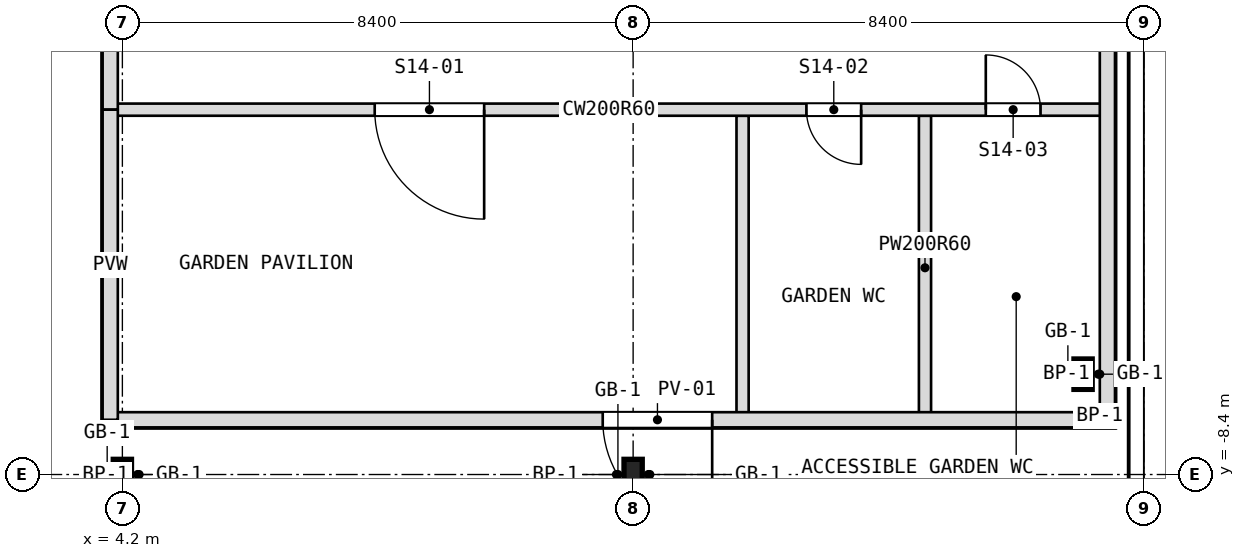
"""IFC4 building model, lengths in metres.
Left out: names, types, materials, properties, quantities, classifications, styles, units other than length and angle.
Written with IfcOpenShell. Run it as: python <this file> out.ifc"""

import sys

from ifc_helpers import new_model, si_unit, direction, frame, frame_2d, origin, origin_2d, place, context, subcontext, project, spatial, rectangle, i_section, extrude, element, fill, save


model = new_model("IFC4")
c1 = context("Model", 3, precision=1e-05, world=origin(), true_north=direction((0.0, 1.0)))
c2 = subcontext(c1, "Body", "Model", "MODEL_VIEW")
j1 = project(units=[si_unit("LENGTHUNIT", "METRE"), si_unit("PLANEANGLEUNIT", "RADIAN")], contexts=[c1])
p1 = place(None, origin())
s1 = spatial("IfcSite", under=j1, at=p1, CompositionType="ELEMENT")
p2 = place(p1, origin())
s2 = spatial("IfcBuilding", under=s1, at=p2, CompositionType="ELEMENT")
p3 = place(p2, frame((0.0, 0.0, 295.7)))
s3 = spatial("IfcBuildingStorey", under=s2, at=p3, CompositionType="ELEMENT", Elevation=295.7)
for number, where, z_axis, x_axis in (
    (1, (20.0, -6.75, -0.3), (0.0, 0.0, 1.0), (1.0, 0.0, 0.0)),
    (2, (4.2, -8.4, -0.3), (0.0, 0.0, 1.0), (1.0, 0.0, 0.0)),
    (3, (12.6, -8.4, -0.3), (0.0, 0.0, 1.0), (1.0, 0.0, 0.0)),
):
    element("IfcColumn", number, at=place(p3, frame(where, z_axis=z_axis, x_axis=x_axis)), inside=s3, PredefinedType="COLUMN", context=c2, shape_type="SweptSolid", body=[
        extrude(i_section(OverallWidth=0.3, OverallDepth=0.5, WebThickness=0.014, FlangeThickness=0.028, FilletRadius=0.027, at=origin_2d()), origin(), (0.0, 0.0, 1.0), 8.15),
    ])
for number, where, z_axis, x_axis in (
    (4, (17.4, -7.5, 0.0), (0.0, 0.0, 1.0), (0.0, 1.0, 0.0)),
    (5, (14.4, -7.5, 0.0), (0.0, 0.0, 1.0), (0.0, 1.0, 0.0)),
):
    element("IfcWall", number, at=place(p3, frame(where, z_axis=z_axis, x_axis=x_axis)), inside=s3, PredefinedType="PARTITIONING", context=c2, shape_type="SweptSolid", body=[
        extrude(rectangle(XDim=5.0, YDim=0.2, at=frame_2d((2.5, 0.0))), origin(), (0.0, 0.0, 1.0), 7.82),
    ])
p4 = place(p3, frame((4.0, -2.4, 0.0), z_axis=(0.0, 0.0, 1.0), x_axis=(1.0, 0.0, 0.0)))
e6 = element("IfcWall", 6, at=p4, inside=s3, PredefinedType="PARTITIONING", context=c2, shape_type="SweptSolid", body=[
    extrude(rectangle(XDim=16.4, YDim=0.2, at=frame_2d((8.2, 0.0))), origin(), (0.0, 0.0, 1.0), 7.82),
])
p5 = place(p4, frame((4.35, 0.0, 0.0)))
e7 = element("IfcOpeningElement", 7, at=p5, cuts=e6, PredefinedType="OPENING", context=c2, shape_type="SweptSolid", body=[
    extrude(rectangle(XDim=1.8, YDim=2.1, at=frame_2d((0.9, 1.05))), frame((0.0, 0.1, 0.0), z_axis=(0.0, -1.0, 0.0), x_axis=(1.0, 0.0, 0.0)), (0.0, 0.0, 1.0), 0.2),
])
p6 = place(p4, frame((11.45, 0.0, 0.0)))
e8 = element("IfcOpeningElement", 8, at=p6, cuts=e6, PredefinedType="OPENING", context=c2, shape_type="SweptSolid", body=[
    extrude(rectangle(XDim=0.9, YDim=2.1, at=frame_2d((0.45, 1.05))), frame((0.0, 0.1, 0.0), z_axis=(0.0, -1.0, 0.0), x_axis=(1.0, 0.0, 0.0)), (0.0, 0.0, 1.0), 0.2),
])
p7 = place(p4, frame((14.4, 0.0, 0.0)))
e9 = element("IfcOpeningElement", 9, at=p7, cuts=e6, PredefinedType="OPENING", context=c2, shape_type="SweptSolid", body=[
    extrude(rectangle(XDim=0.9, YDim=2.1, at=frame_2d((0.45, 1.05))), frame((0.0, 0.1, 0.0), z_axis=(0.0, -1.0, 0.0), x_axis=(1.0, 0.0, 0.0)), (0.0, 0.0, 1.0), 0.2),
])
p8 = place(p3, frame((4.0, -2.4, 0.0), z_axis=(0.0, 0.0, 1.0), x_axis=(0.0, 1.0, 0.0)))
e10 = element("IfcWall", 10, at=p8, inside=s3, PredefinedType="SOLIDWALL", context=c2, shape_type="SweptSolid", body=[
    extrude(rectangle(XDim=2.4, YDim=0.25, at=frame_2d((1.2, 0.0))), origin(), (0.0, 0.0, 1.0), 7.82),
])
p9 = place(p3, frame((20.4, 16.8, 0.0), z_axis=(0.0, 0.0, 1.0), x_axis=(0.0, -1.0, 0.0)))
e11 = element("IfcWall", 11, at=p9, inside=s3, PredefinedType="SOLIDWALL", context=c2, shape_type="SweptSolid", body=[
    extrude(rectangle(XDim=24.3, YDim=0.25, at=frame_2d((12.15, 0.0))), origin(), (0.0, 0.0, 1.0), 7.82),
])
p10 = place(p3, frame((20.4, -7.5, 0.0), z_axis=(0.0, 0.0, 1.0), x_axis=(-1.0, 0.0, 0.0)))
e12 = element("IfcWall", 12, at=p10, inside=s3, PredefinedType="SOLIDWALL", context=c2, shape_type="SweptSolid", body=[
    extrude(rectangle(XDim=16.4, YDim=0.25, at=frame_2d((8.2, 0.0))), origin(), (0.0, 0.0, 1.0), 7.82),
])
p11 = place(p10, frame((6.5, 0.0, 0.0)))
e13 = element("IfcOpeningElement", 13, at=p11, cuts=e12, PredefinedType="OPENING", context=c2, shape_type="SweptSolid", body=[
    extrude(rectangle(XDim=1.8, YDim=2.4, at=frame_2d((0.9, 1.2))), frame((0.0, 0.125, 0.0), z_axis=(0.0, -1.0, 0.0), x_axis=(1.0, 0.0, 0.0)), (0.0, 0.0, 1.0), 0.25),
])
p12 = place(p3, frame((4.0, -7.5, 0.0), z_axis=(0.0, 0.0, 1.0), x_axis=(0.0, 1.0, 0.0)))
e14 = element("IfcWall", 14, at=p12, inside=s3, PredefinedType="SOLIDWALL", context=c2, shape_type="SweptSolid", body=[
    extrude(rectangle(XDim=5.1, YDim=0.25, at=frame_2d((2.55, 0.0))), origin(), (0.0, 0.0, 1.0), 7.82),
])
p13 = place(p5, origin())
e15 = element("IfcDoor", 15, at=p13, inside=s3, OperationType="DOUBLE_DOOR_SINGLE_SWING", PredefinedType="DOOR", context=c2, shape_type="SweptSolid", body=[
    extrude(rectangle(XDim=1.8, YDim=2.1, at=frame_2d((0.9, 1.05))), frame((0.0, 0.025, 0.0), z_axis=(0.0, -1.0, 0.0), x_axis=(1.0, 0.0, 0.0)), (0.0, 0.0, 1.0), 0.05),
])
fill(e7, e15)
p14 = place(p6, origin())
e16 = element("IfcDoor", 16, at=p14, inside=s3, OperationType="SINGLE_SWING_RIGHT", PredefinedType="DOOR", context=c2, shape_type="SweptSolid", body=[
    extrude(rectangle(XDim=0.9, YDim=2.1, at=frame_2d((0.45, 1.05))), frame((0.0, 0.025, 0.0), z_axis=(0.0, -1.0, 0.0), x_axis=(1.0, 0.0, 0.0)), (0.0, 0.0, 1.0), 0.05),
])
fill(e8, e16)
p15 = place(p7, origin())
e17 = element("IfcDoor", 17, at=p15, inside=s3, OperationType="SINGLE_SWING_RIGHT", PredefinedType="DOOR", context=c2, shape_type="SweptSolid", body=[
    extrude(rectangle(XDim=0.9, YDim=2.1, at=frame_2d((0.45, 1.05))), frame((0.0, 0.025, 0.0), z_axis=(0.0, -1.0, 0.0), x_axis=(1.0, 0.0, 0.0)), (0.0, 0.0, 1.0), 0.05),
])
fill(e9, e17)
p16 = place(p11, origin())
e18 = element("IfcDoor", 18, at=p16, inside=s3, OperationType="SINGLE_SWING_LEFT", PredefinedType="DOOR", context=c2, shape_type="SweptSolid", body=[
    extrude(rectangle(XDim=1.8, YDim=2.4, at=frame_2d((0.9, 1.2))), frame((0.0, 0.025, 0.0), z_axis=(0.0, -1.0, 0.0), x_axis=(1.0, 0.0, 0.0)), (0.0, 0.0, 1.0), 0.05),
])
fill(e13, e18)
save(model, sys.argv[1])
